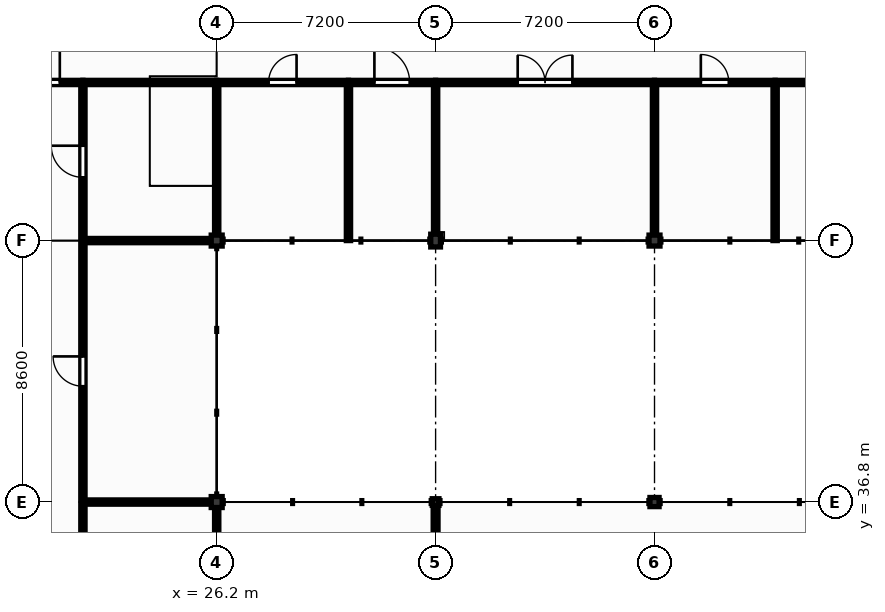
"""IFC4 building model, lengths in metres.
Left out: names, types, materials, properties, quantities, classifications, styles, units other than length and angle.
Written with IfcOpenShell. Run it as: python <this file> out.ifc"""

import sys

from ifc_helpers import new_model, si_unit, direction, frame, frame_2d, origin, origin_2d, place, context, subcontext, project, spatial, rectangle, hollow_circle, i_section, extrude, element, fill, save


model = new_model("IFC4")
c1 = context("Model", 3, precision=1e-05, world=origin(), true_north=direction((0.0, 1.0)))
c2 = subcontext(c1, "Body", "Model", "MODEL_VIEW")
j1 = project(units=[si_unit("LENGTHUNIT", "METRE"), si_unit("PLANEANGLEUNIT", "RADIAN")], contexts=[c1])
p1 = place(None, origin())
s1 = spatial("IfcSite", under=j1, at=p1, CompositionType="ELEMENT")
p2 = place(p1, origin())
s2 = spatial("IfcBuilding", under=s1, at=p2, CompositionType="ELEMENT")
p3 = place(p2, frame((0.0, 0.0, 4.5)))
s3 = spatial("IfcBuildingStorey", under=s2, at=p3, CompositionType="ELEMENT", Elevation=4.5)
for number, where, z_axis, x_axis in (
    (1, (26.2, 36.8, 0.0), (0.0, 0.0, 1.0), (1.0, 0.0, 0.0)),
    (2, (26.2, 45.4, 0.0), (0.0, 0.0, 1.0), (1.0, 0.0, 0.0)),
):
    element("IfcColumn", number, at=place(p3, frame(where, z_axis=z_axis, x_axis=x_axis)), inside=s3, PredefinedType="COLUMN", context=c2, shape_type="SweptSolid", body=[
        extrude(rectangle(XDim=0.36, YDim=0.36, at=origin_2d()), origin(), (0.0, 0.0, 1.0), 4.26),
    ])
p4 = place(p3, frame((33.4, 36.8, 0.0), z_axis=(0.0, 0.0, 1.0), x_axis=(1.0, 0.0, 0.0)))
e3 = element("IfcColumn", 3, at=p4, inside=s3, PredefinedType="COLUMN", context=c2, shape_type="SweptSolid", body=[
    extrude(hollow_circle(Radius=0.11, WallThickness=0.01, at=origin_2d()), origin(), (0.0, 0.0, 1.0), 4.3),
])
p5 = place(p3, frame((33.4, 45.4, 0.0), z_axis=(0.0, 0.0, 1.0), x_axis=(1.0, 0.0, 0.0)))
e4 = element("IfcColumn", 4, at=p5, inside=s3, PredefinedType="COLUMN", context=c2, shape_type="SweptSolid", body=[
    extrude(rectangle(XDim=0.32, YDim=0.42, at=origin_2d()), origin(), (0.0, 0.0, 1.0), 4.26),
])
p6 = place(p3, frame((40.6, 36.8, 0.0), z_axis=(0.0, 0.0, 1.0), x_axis=(1.0, 0.0, 0.0)))
e5 = element("IfcColumn", 5, at=p6, inside=s3, PredefinedType="COLUMN", context=c2, shape_type="SweptSolid", body=[
    extrude(i_section(OverallWidth=0.3, OverallDepth=0.3, WebThickness=0.011, FlangeThickness=0.019, FilletRadius=0.027, at=origin_2d()), origin(), (0.0, 0.0, 1.0), 4.3),
])
p7 = place(p3, frame((40.6, 45.4, 0.0), z_axis=(0.0, 0.0, 1.0), x_axis=(1.0, 0.0, 0.0)))
e6 = element("IfcColumn", 6, at=p7, inside=s3, PredefinedType="COLUMN", context=c2, shape_type="SweptSolid", body=[
    extrude(rectangle(XDim=0.36, YDim=0.36, at=origin_2d()), origin(), (0.0, 0.0, 1.0), 4.26),
])
p8 = place(p3, frame((19.0, 50.6, 0.0), z_axis=(0.0, 0.0, 1.0), x_axis=(1.0, 0.0, 0.0)))
e7 = element("IfcWall", 7, at=p8, inside=s3, PredefinedType="PARTITIONING", context=c2, shape_type="SweptSolid", body=[
    extrude(rectangle(XDim=2.8, YDim=0.14, at=frame_2d((1.4, 0.0))), origin(), (0.0, 0.0, 1.0), 4.18),
])
p9 = place(p8, frame((0.76, 0.0, 0.0)))
e8 = element("IfcOpeningElement", 8, at=p9, cuts=e7, PredefinedType="OPENING", context=c2, shape_type="SweptSolid", body=[
    extrude(rectangle(XDim=1.28, YDim=2.2, at=frame_2d((0.64, 1.1))), frame((0.0, 0.08, 0.0), z_axis=(0.0, -1.0, 0.0), x_axis=(1.0, 0.0, 0.0)), (0.0, 0.0, 1.0), 0.16),
])
p10 = place(p3, frame((21.8, 27.27, 0.0), z_axis=(0.0, 0.0, 1.0), x_axis=(0.0, 1.0, 0.0)))
e9 = element("IfcWall", 9, at=p10, inside=s3, PredefinedType="PARTITIONING", context=c2, shape_type="SweptSolid", body=[
    extrude(rectangle(XDim=9.46, YDim=0.14, at=frame_2d((4.73, 0.0))), origin(), (0.0, 0.0, 1.0), 4.18),
])
p11 = place(p10, frame((4.09, 0.0, 0.0)))
e10 = element("IfcOpeningElement", 10, at=p11, cuts=e9, PredefinedType="OPENING", context=c2, shape_type="SweptSolid", body=[
    extrude(rectangle(XDim=1.28, YDim=2.2, at=frame_2d((0.64, 1.1))), frame((0.0, 0.08, 0.0), z_axis=(0.0, -1.0, 0.0), x_axis=(1.0, 0.0, 0.0)), (0.0, 0.0, 1.0), 0.16),
])
p12 = place(p3, frame((21.8, 36.87, 0.0), z_axis=(0.0, 0.0, 1.0), x_axis=(0.0, 1.0, 0.0)))
e11 = element("IfcWall", 11, at=p12, inside=s3, PredefinedType="PARTITIONING", context=c2, shape_type="SweptSolid", body=[
    extrude(rectangle(XDim=8.46, YDim=0.14, at=frame_2d((4.23, 0.0))), origin(), (0.0, 0.0, 1.0), 4.18),
])
p13 = place(p12, frame((3.74, 0.0, 0.0)))
e12 = element("IfcOpeningElement", 12, at=p13, cuts=e11, PredefinedType="OPENING", context=c2, shape_type="SweptSolid", body=[
    extrude(rectangle(XDim=0.98, YDim=2.15, at=frame_2d((0.49, 1.075))), frame((0.0, 0.08, 0.0), z_axis=(0.0, -1.0, 0.0), x_axis=(1.0, 0.0, 0.0)), (0.0, 0.0, 1.0), 0.16),
])
p14 = place(p3, frame((21.8, 36.8, 0.0), z_axis=(0.0, 0.0, 1.0), x_axis=(1.0, 0.0, 0.0)))
e13 = element("IfcWall", 13, at=p14, inside=s3, PredefinedType="PARTITIONING", context=c2, shape_type="SweptSolid", body=[
    extrude(rectangle(XDim=4.22, YDim=0.14, at=frame_2d((2.11, 0.0))), origin(), (0.0, 0.0, 1.0), 3.62),
])
p15 = place(p3, frame((21.8, 45.47, 0.0), z_axis=(0.0, 0.0, 1.0), x_axis=(0.0, 1.0, 0.0)))
e14 = element("IfcWall", 14, at=p15, inside=s3, PredefinedType="PARTITIONING", context=c2, shape_type="SweptSolid", body=[
    extrude(rectangle(XDim=5.06, YDim=0.14, at=frame_2d((2.53, 0.0))), origin(), (0.0, 0.0, 1.0), 4.18),
])
p16 = place(p15, frame((2.01, 0.0, 0.0)))
e15 = element("IfcOpeningElement", 15, at=p16, cuts=e14, PredefinedType="OPENING", context=c2, shape_type="SweptSolid", body=[
    extrude(rectangle(XDim=1.04, YDim=2.1, at=frame_2d((0.52, 1.05))), frame((0.0, 0.08, 0.0), z_axis=(0.0, -1.0, 0.0), x_axis=(1.0, 0.0, 0.0)), (0.0, 0.0, 1.0), 0.16),
])
p17 = place(p3, frame((21.8, 45.4, 0.0), z_axis=(0.0, 0.0, 1.0), x_axis=(1.0, 0.0, 0.0)))
e16 = element("IfcWall", 16, at=p17, inside=s3, PredefinedType="PARTITIONING", context=c2, shape_type="SweptSolid", body=[
    extrude(rectangle(XDim=4.22, YDim=0.14, at=frame_2d((2.11, 0.0))), origin(), (0.0, 0.0, 1.0), 3.66),
])
p18 = place(p3, frame((21.8, 50.6, 0.0), z_axis=(0.0, 0.0, 1.0), x_axis=(1.0, 0.0, 0.0)))
e17 = element("IfcWall", 17, at=p18, inside=s3, PredefinedType="PARTITIONING", context=c2, shape_type="SweptSolid", body=[
    extrude(rectangle(XDim=4.4, YDim=0.14, at=frame_2d((2.2, 0.0))), origin(), (0.0, 0.0, 1.0), 4.18),
])
p19 = place(p3, frame((26.2, 27.38, 0.0), z_axis=(0.0, 0.0, 1.0), x_axis=(0.0, 1.0, 0.0)))
e18 = element("IfcWall", 18, at=p19, inside=s3, PredefinedType="PARTITIONING", context=c2, shape_type="SweptSolid", body=[
    extrude(rectangle(XDim=9.24, YDim=0.14, at=frame_2d((4.62, 0.0))), origin(), (0.0, 0.0, 1.0), 3.97),
])
p20 = place(p19, frame((3.98, 0.0, 0.0)))
e19 = element("IfcOpeningElement", 19, at=p20, cuts=e18, PredefinedType="OPENING", context=c2, shape_type="SweptSolid", body=[
    extrude(rectangle(XDim=1.28, YDim=2.2, at=frame_2d((0.64, 1.1))), frame((0.0, 0.08, 0.0), z_axis=(0.0, -1.0, 0.0), x_axis=(1.0, 0.0, 0.0)), (0.0, 0.0, 1.0), 0.16),
])
p21 = place(p3, frame((26.2, 45.58, 0.0), z_axis=(0.0, 0.0, 1.0), x_axis=(0.0, 1.0, 0.0)))
e20 = element("IfcWall", 20, at=p21, inside=s3, PredefinedType="PARTITIONING", context=c2, shape_type="SweptSolid", body=[
    extrude(rectangle(XDim=4.95, YDim=0.14, at=frame_2d((2.475, 0.0))), origin(), (0.0, 0.0, 1.0), 3.74),
])
p22 = place(p3, frame((26.2, 50.6, 0.0), z_axis=(0.0, 0.0, 1.0), x_axis=(1.0, 0.0, 0.0)))
e21 = element("IfcWall", 21, at=p22, inside=s3, PredefinedType="PARTITIONING", context=c2, shape_type="SweptSolid", body=[
    extrude(rectangle(XDim=4.334, YDim=0.14, at=frame_2d((2.167, 0.0))), origin(), (0.0, 0.0, 1.0), 4.18),
])
p23 = place(p22, frame((1.707, 0.0, 0.0)))
e22 = element("IfcOpeningElement", 22, at=p23, cuts=e21, PredefinedType="OPENING", context=c2, shape_type="SweptSolid", body=[
    extrude(rectangle(XDim=0.92, YDim=2.1, at=frame_2d((0.46, 1.05))), frame((0.0, 0.08, 0.0), z_axis=(0.0, -1.0, 0.0), x_axis=(1.0, 0.0, 0.0)), (0.0, 0.0, 1.0), 0.16),
])
p24 = place(p3, frame((30.534, 45.4, 0.0), z_axis=(0.0, 0.0, 1.0), x_axis=(0.0, 1.0, 0.0)))
e23 = element("IfcWall", 23, at=p24, inside=s3, PredefinedType="PARTITIONING", context=c2, shape_type="SweptSolid", body=[
    extrude(rectangle(XDim=5.13, YDim=0.14, at=frame_2d((2.565, 0.0))), origin(), (0.0, 0.0, 1.0), 4.18),
])
p25 = place(p3, frame((30.534, 50.6, 0.0), z_axis=(0.0, 0.0, 1.0), x_axis=(1.0, 0.0, 0.0)))
e24 = element("IfcWall", 24, at=p25, inside=s3, PredefinedType="PARTITIONING", context=c2, shape_type="SweptSolid", body=[
    extrude(rectangle(XDim=2.866, YDim=0.14, at=frame_2d((1.433, 0.0))), origin(), (0.0, 0.0, 1.0), 4.18),
])
p26 = place(p25, frame((0.853, 0.0, 0.0)))
e25 = element("IfcOpeningElement", 25, at=p26, cuts=e24, PredefinedType="OPENING", context=c2, shape_type="SweptSolid", body=[
    extrude(rectangle(XDim=1.16, YDim=2.1, at=frame_2d((0.58, 1.05))), frame((0.0, 0.08, 0.0), z_axis=(0.0, -1.0, 0.0), x_axis=(1.0, 0.0, 0.0)), (0.0, 0.0, 1.0), 0.16),
])
p27 = place(p3, frame((33.4, 45.61, 0.0), z_axis=(0.0, 0.0, 1.0), x_axis=(0.0, 1.0, 0.0)))
e26 = element("IfcWall", 26, at=p27, inside=s3, PredefinedType="PARTITIONING", context=c2, shape_type="SweptSolid", body=[
    extrude(rectangle(XDim=4.92, YDim=0.14, at=frame_2d((2.46, 0.0))), origin(), (0.0, 0.0, 1.0), 3.74),
])
p28 = place(p3, frame((33.4, 50.6, 0.0), z_axis=(0.0, 0.0, 1.0), x_axis=(1.0, 0.0, 0.0)))
e27 = element("IfcWall", 27, at=p28, inside=s3, PredefinedType="PARTITIONING", context=c2, shape_type="SweptSolid", body=[
    extrude(rectangle(XDim=7.2, YDim=0.14, at=frame_2d((3.6, 0.0))), origin(), (0.0, 0.0, 1.0), 4.18),
])
p29 = place(p28, frame((2.7, 0.0, 0.0)))
e28 = element("IfcOpeningElement", 28, at=p29, cuts=e27, PredefinedType="OPENING", context=c2, shape_type="SweptSolid", body=[
    extrude(rectangle(XDim=1.8, YDim=2.3, at=frame_2d((0.9, 1.15))), frame((0.0, 0.08, 0.0), z_axis=(0.0, -1.0, 0.0), x_axis=(1.0, 0.0, 0.0)), (0.0, 0.0, 1.0), 0.16),
])
p30 = place(p3, frame((40.6, 45.58, 0.0), z_axis=(0.0, 0.0, 1.0), x_axis=(0.0, 1.0, 0.0)))
e29 = element("IfcWall", 29, at=p30, inside=s3, PredefinedType="PARTITIONING", context=c2, shape_type="SweptSolid", body=[
    extrude(rectangle(XDim=4.95, YDim=0.14, at=frame_2d((2.475, 0.0))), origin(), (0.0, 0.0, 1.0), 3.74),
])
p31 = place(p3, frame((40.6, 50.6, 0.0), z_axis=(0.0, 0.0, 1.0), x_axis=(1.0, 0.0, 0.0)))
e30 = element("IfcWall", 30, at=p31, inside=s3, PredefinedType="PARTITIONING", context=c2, shape_type="SweptSolid", body=[
    extrude(rectangle(XDim=3.967, YDim=0.14, at=frame_2d((1.983, 0.0))), origin(), (0.0, 0.0, 1.0), 4.18),
])
p32 = place(p31, frame((1.523, 0.0, 0.0)))
e31 = element("IfcOpeningElement", 31, at=p32, cuts=e30, PredefinedType="OPENING", context=c2, shape_type="SweptSolid", body=[
    extrude(rectangle(XDim=0.92, YDim=2.1, at=frame_2d((0.46, 1.05))), frame((0.0, 0.08, 0.0), z_axis=(0.0, -1.0, 0.0), x_axis=(1.0, 0.0, 0.0)), (0.0, 0.0, 1.0), 0.16),
])
p33 = place(p3, frame((44.567, 45.4, 0.0), z_axis=(0.0, 0.0, 1.0), x_axis=(0.0, 1.0, 0.0)))
e32 = element("IfcWall", 32, at=p33, inside=s3, PredefinedType="PARTITIONING", context=c2, shape_type="SweptSolid", body=[
    extrude(rectangle(XDim=5.13, YDim=0.14, at=frame_2d((2.565, 0.0))), origin(), (0.0, 0.0, 1.0), 4.18),
])
p34 = place(p3, frame((44.567, 50.6, 0.0), z_axis=(0.0, 0.0, 1.0), x_axis=(1.0, 0.0, 0.0)))
e33 = element("IfcWall", 33, at=p34, inside=s3, PredefinedType="PARTITIONING", context=c2, shape_type="SweptSolid", body=[
    extrude(rectangle(XDim=3.233, YDim=0.14, at=frame_2d((1.617, 0.0))), origin(), (0.0, 0.0, 1.0), 4.18),
])
p35 = place(p34, frame((1.037, 0.0, 0.0)))
e34 = element("IfcOpeningElement", 34, at=p35, cuts=e33, PredefinedType="OPENING", context=c2, shape_type="SweptSolid", body=[
    extrude(rectangle(XDim=1.16, YDim=2.1, at=frame_2d((0.58, 1.05))), frame((0.0, 0.08, 0.0), z_axis=(0.0, -1.0, 0.0), x_axis=(1.0, 0.0, 0.0)), (0.0, 0.0, 1.0), 0.16),
])
p36 = place(p3, frame((33.4, 27.31, 0.0), z_axis=(0.0, 0.0, 1.0), x_axis=(0.0, 1.0, 0.0)))
e35 = element("IfcWall", 35, at=p36, inside=s3, PredefinedType="PARTITIONING", context=c2, shape_type="SweptSolid", body=[
    extrude(rectangle(XDim=9.381, YDim=0.16, at=frame_2d((4.69, 0.0))), origin(), (0.0, 0.0, 1.0), 4.18),
])
p37 = place(p9, origin())
e36 = element("IfcDoor", 36, at=p37, inside=s3, OperationType="SINGLE_SWING_RIGHT", PredefinedType="DOOR", context=c2, shape_type="SweptSolid", body=[
    extrude(rectangle(XDim=1.28, YDim=2.2, at=frame_2d((0.64, 1.1))), frame((0.0, 0.025, 0.0), z_axis=(0.0, -1.0, 0.0), x_axis=(1.0, 0.0, 0.0)), (0.0, 0.0, 1.0), 0.05),
])
fill(e8, e36)
p38 = place(p13, origin())
e37 = element("IfcDoor", 37, at=p38, inside=s3, OperationType="SINGLE_SWING_RIGHT", PredefinedType="DOOR", context=c2, shape_type="SweptSolid", body=[
    extrude(rectangle(XDim=0.98, YDim=2.15, at=frame_2d((0.49, 1.075))), frame((0.0, 0.025, 0.0), z_axis=(0.0, -1.0, 0.0), x_axis=(1.0, 0.0, 0.0)), (0.0, 0.0, 1.0), 0.05),
])
fill(e12, e37)
p39 = place(p16, origin())
e38 = element("IfcDoor", 38, at=p39, inside=s3, OperationType="SINGLE_SWING_RIGHT", PredefinedType="DOOR", context=c2, shape_type="SweptSolid", body=[
    extrude(rectangle(XDim=1.04, YDim=2.1, at=frame_2d((0.52, 1.05))), frame((0.0, 0.025, 0.0), z_axis=(0.0, -1.0, 0.0), x_axis=(1.0, 0.0, 0.0)), (0.0, 0.0, 1.0), 0.05),
])
fill(e15, e38)
p40 = place(p23, origin())
e39 = element("IfcDoor", 39, at=p40, inside=s3, OperationType="SINGLE_SWING_RIGHT", PredefinedType="DOOR", context=c2, shape_type="SweptSolid", body=[
    extrude(rectangle(XDim=0.92, YDim=2.1, at=frame_2d((0.46, 1.05))), frame((0.0, 0.025, 0.0), z_axis=(0.0, -1.0, 0.0), x_axis=(1.0, 0.0, 0.0)), (0.0, 0.0, 1.0), 0.05),
])
fill(e22, e39)
p41 = place(p26, origin())
e40 = element("IfcDoor", 40, at=p41, inside=s3, OperationType="SINGLE_SWING_LEFT", PredefinedType="DOOR", context=c2, shape_type="SweptSolid", body=[
    extrude(rectangle(XDim=1.16, YDim=2.1, at=frame_2d((0.58, 1.05))), frame((0.0, 0.025, 0.0), z_axis=(0.0, -1.0, 0.0), x_axis=(1.0, 0.0, 0.0)), (0.0, 0.0, 1.0), 0.05),
])
fill(e25, e40)
p42 = place(p29, origin())
e41 = element("IfcDoor", 41, at=p42, inside=s3, OperationType="DOUBLE_DOOR_SINGLE_SWING", PredefinedType="DOOR", context=c2, shape_type="SweptSolid", body=[
    extrude(rectangle(XDim=1.8, YDim=2.3, at=frame_2d((0.9, 1.15))), frame((0.0, 0.025, 0.0), z_axis=(0.0, -1.0, 0.0), x_axis=(1.0, 0.0, 0.0)), (0.0, 0.0, 1.0), 0.05),
])
fill(e28, e41)
p43 = place(p32, origin())
e42 = element("IfcDoor", 42, at=p43, inside=s3, OperationType="SINGLE_SWING_LEFT", PredefinedType="DOOR", context=c2, shape_type="SweptSolid", body=[
    extrude(rectangle(XDim=0.92, YDim=2.1, at=frame_2d((0.46, 1.05))), frame((0.0, 0.025, 0.0), z_axis=(0.0, -1.0, 0.0), x_axis=(1.0, 0.0, 0.0)), (0.0, 0.0, 1.0), 0.05),
])
fill(e31, e42)
save(model, sys.argv[1])
